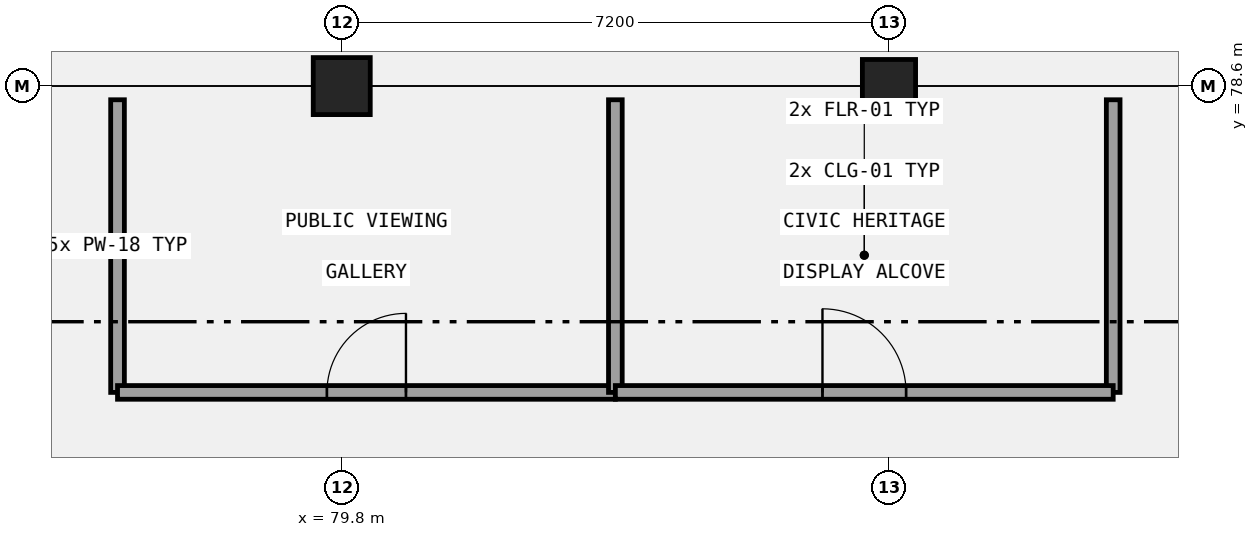
"""IFC4 building model, lengths in metres.
Left out: names, types, materials, properties, quantities, classifications, styles, units other than length and angle.
Written with IfcOpenShell. Run it as: python <this file> out.ifc"""

import sys

from ifc_helpers import new_model, si_unit, direction, frame, frame_2d, origin, origin_2d, place, context, subcontext, project, spatial, rectangle, extrude, element, fill, save


model = new_model("IFC4")
c1 = context("Model", 3, precision=1e-05, world=origin(), true_north=direction((0.0, 1.0)))
c2 = subcontext(c1, "Body", "Model", "MODEL_VIEW")
j1 = project(units=[si_unit("LENGTHUNIT", "METRE"), si_unit("PLANEANGLEUNIT", "RADIAN")], contexts=[c1])
p1 = place(None, origin())
s1 = spatial("IfcSite", under=j1, at=p1, CompositionType="ELEMENT")
p2 = place(p1, origin())
s2 = spatial("IfcBuilding", under=s1, at=p2, CompositionType="ELEMENT")
p3 = place(p2, frame((0.0, 0.0, 5.4)))
s3 = spatial("IfcBuildingStorey", under=s2, at=p3, CompositionType="ELEMENT", Elevation=5.4)
p4 = place(p3, frame((79.8, 78.6, 0.0), z_axis=(0.0, 0.0, 1.0), x_axis=(1.0, 0.0, 0.0)))
e1 = element("IfcColumn", 1, at=p4, inside=s3, PredefinedType="COLUMN", context=c2, shape_type="SweptSolid", body=[
    extrude(rectangle(XDim=0.75, YDim=0.75, at=origin_2d()), origin(), (0.0, 0.0, 1.0), 4.2),
])
p5 = place(p3, frame((87.0, 78.6, 0.0), z_axis=(0.0, 0.0, 1.0), x_axis=(1.0, 0.0, 0.0)))
e2 = element("IfcColumn", 2, at=p5, inside=s3, PredefinedType="COLUMN", context=c2, shape_type="SweptSolid", body=[
    extrude(rectangle(XDim=0.7, YDim=0.7, at=origin_2d()), origin(), (0.0, 0.0, 1.0), 4.2),
])
for number, where, z_axis, x_axis in (
    (3, (76.85, 74.57, 0.0), (0.0, 0.0, 1.0), (0.0, 1.0, 0.0)),
    (4, (89.95, 74.57, 0.0), (0.0, 0.0, 1.0), (0.0, 1.0, 0.0)),
):
    element("IfcWall", number, at=place(p3, frame(where, z_axis=z_axis, x_axis=x_axis)), inside=s3, PredefinedType="PARTITIONING", context=c2, shape_type="SweptSolid", body=[
        extrude(rectangle(XDim=3.85, YDim=0.18, at=frame_2d((1.925, 0.0))), origin(), (0.0, 0.0, 1.0), 3.92),
    ])
p6 = place(p3, frame((76.85, 74.57, 0.0), z_axis=(0.0, 0.0, 1.0), x_axis=(1.0, 0.0, 0.0)))
e5 = element("IfcWall", 5, at=p6, inside=s3, PredefinedType="PARTITIONING", context=c2, shape_type="SweptSolid", body=[
    extrude(rectangle(XDim=6.55, YDim=0.18, at=frame_2d((3.275, 0.0))), origin(), (0.0, 0.0, 1.0), 3.92),
])
p7 = place(p6, frame((2.755, 0.0, 0.0)))
e6 = element("IfcOpeningElement", 6, at=p7, cuts=e5, PredefinedType="OPENING", context=c2, shape_type="SweptSolid", body=[
    extrude(rectangle(XDim=1.04, YDim=2.35, at=frame_2d((0.52, 1.175))), frame((0.0, 0.1, 0.0), z_axis=(0.0, -1.0, 0.0), x_axis=(1.0, 0.0, 0.0)), (0.0, 0.0, 1.0), 0.2),
])
p8 = place(p3, frame((83.4, 74.57, 0.0), z_axis=(0.0, 0.0, 1.0), x_axis=(0.0, 1.0, 0.0)))
e7 = element("IfcWall", 7, at=p8, inside=s3, PredefinedType="PARTITIONING", context=c2, shape_type="SweptSolid", body=[
    extrude(rectangle(XDim=3.85, YDim=0.18, at=frame_2d((1.925, 0.0))), origin(), (0.0, 0.0, 1.0), 3.92),
])
p9 = place(p3, frame((83.4, 74.57, 0.0), z_axis=(0.0, 0.0, 1.0), x_axis=(1.0, 0.0, 0.0)))
e8 = element("IfcWall", 8, at=p9, inside=s3, PredefinedType="PARTITIONING", context=c2, shape_type="SweptSolid", body=[
    extrude(rectangle(XDim=6.55, YDim=0.18, at=frame_2d((3.275, 0.0))), origin(), (0.0, 0.0, 1.0), 3.92),
])
p10 = place(p9, frame((2.725, 0.0, 0.0)))
e9 = element("IfcOpeningElement", 9, at=p10, cuts=e8, PredefinedType="OPENING", context=c2, shape_type="SweptSolid", body=[
    extrude(rectangle(XDim=1.1, YDim=2.1, at=frame_2d((0.55, 1.05))), frame((0.0, 0.1, 0.0), z_axis=(0.0, -1.0, 0.0), x_axis=(1.0, 0.0, 0.0)), (0.0, 0.0, 1.0), 0.2),
])
p11 = place(p7, origin())
e10 = element("IfcDoor", 10, at=p11, inside=s3, OperationType="SINGLE_SWING_RIGHT", PredefinedType="DOOR", context=c2, shape_type="SweptSolid", body=[
    extrude(rectangle(XDim=1.04, YDim=2.35, at=frame_2d((0.52, 1.175))), frame((0.0, 0.025, 0.0), z_axis=(0.0, -1.0, 0.0), x_axis=(1.0, 0.0, 0.0)), (0.0, 0.0, 1.0), 0.05),
])
fill(e6, e10)
p12 = place(p10, origin())
e11 = element("IfcDoor", 11, at=p12, inside=s3, OperationType="SINGLE_SWING_LEFT", PredefinedType="DOOR", context=c2, shape_type="SweptSolid", body=[
    extrude(rectangle(XDim=1.1, YDim=2.1, at=frame_2d((0.55, 1.05))), frame((0.0, 0.025, 0.0), z_axis=(0.0, -1.0, 0.0), x_axis=(1.0, 0.0, 0.0)), (0.0, 0.0, 1.0), 0.05),
])
fill(e9, e11)
save(model, sys.argv[1])
